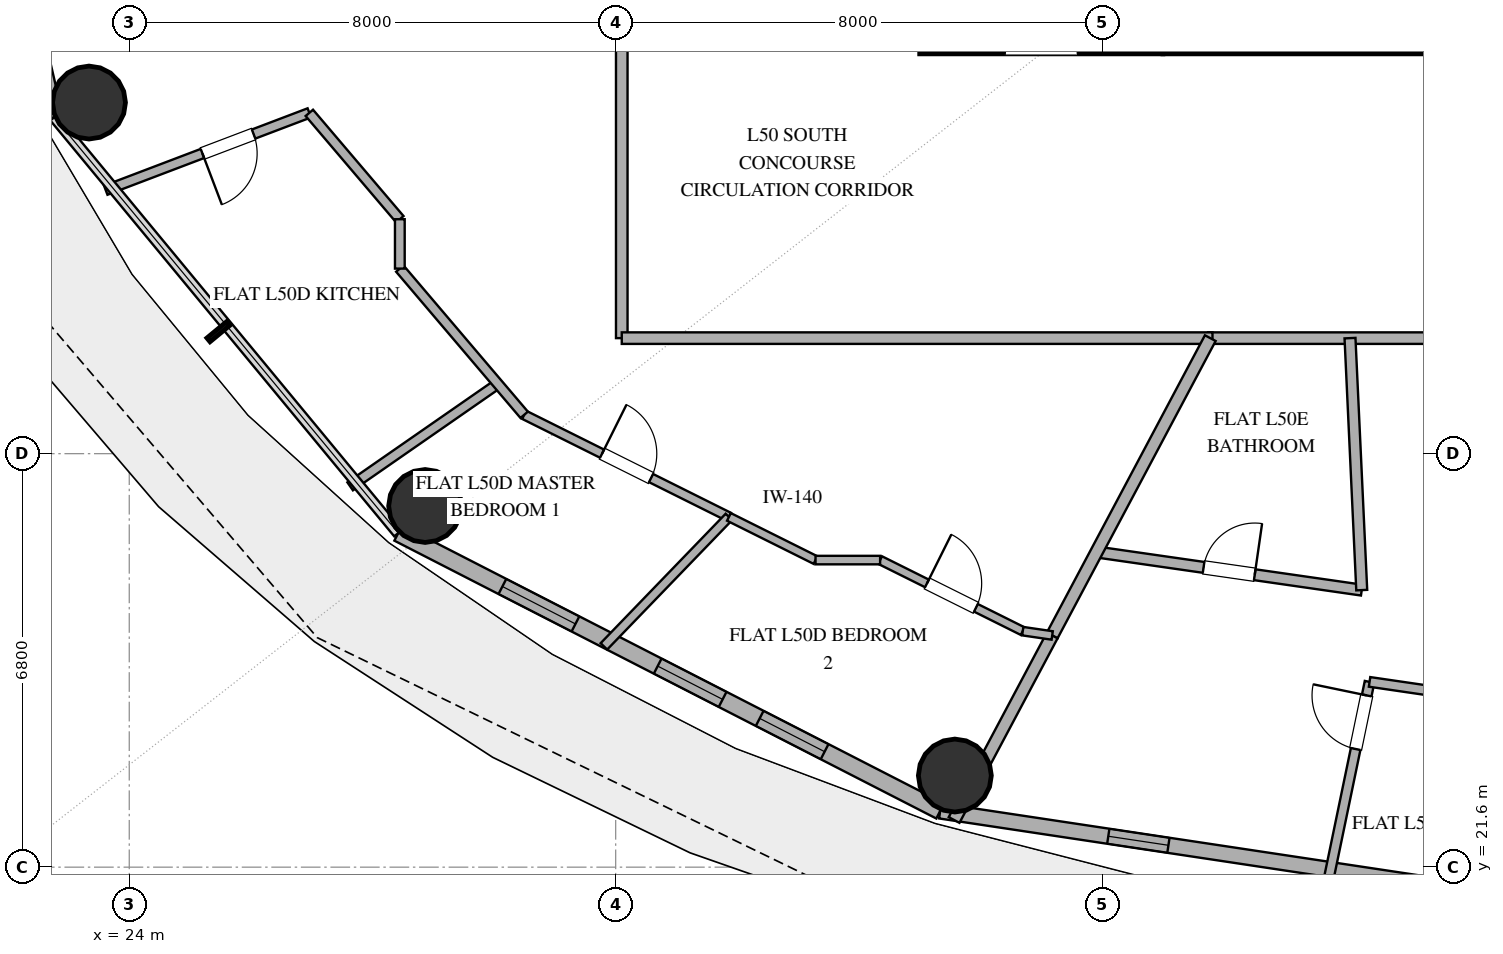
"""IFC4 building model, lengths in metres.
Left out: names, types, materials, properties, quantities, classifications, styles, units other than length and angle.
Written with IfcOpenShell. Run it as: python <this file> out.ifc"""

import sys

from ifc_helpers import new_model, si_unit, direction, frame, frame_2d, origin, origin_2d, place, context, subcontext, project, spatial, rectangle, hollow_circle, extrude, element, fill, save


model = new_model("IFC4")
c1 = context("Model", 3, precision=1e-05, world=origin(), true_north=direction((0.0, 1.0)))
c2 = subcontext(c1, "Body", "Model", "MODEL_VIEW")
j1 = project(units=[si_unit("LENGTHUNIT", "METRE"), si_unit("PLANEANGLEUNIT", "RADIAN")], contexts=[c1])
p1 = place(None, origin())
s1 = spatial("IfcSite", under=j1, at=p1, CompositionType="ELEMENT")
p2 = place(p1, origin())
s2 = spatial("IfcBuilding", under=s1, at=p2, CompositionType="ELEMENT")
p3 = place(p2, frame((0.0, 0.0, 197.4)))
s3 = spatial("IfcBuildingStorey", under=s2, at=p3, CompositionType="ELEMENT", Elevation=197.4)
p4 = place(p3, frame((37.0, 35.2, 0.0), z_axis=(0.0, 0.0, 1.0), x_axis=(1.0, 0.0, 0.0)))
e1 = element("IfcWall", 1, at=p4, inside=s3, PredefinedType="SHEAR", context=c2, shape_type="SweptSolid", body=[
    extrude(rectangle(XDim=4.0, YDim=0.45, at=frame_2d((2.0, 0.0))), origin(), (0.0, 0.0, 1.0), 3.25),
])
p5 = place(p4, frame((1.4, 0.0, 0.0)))
e2 = element("IfcOpeningElement", 2, at=p5, cuts=e1, PredefinedType="OPENING", context=c2, shape_type="SweptSolid", body=[
    extrude(rectangle(XDim=1.2, YDim=2.15, at=frame_2d((0.6, 1.075))), frame((0.0, 0.235, 0.0), z_axis=(0.0, -1.0, 0.0), x_axis=(1.0, 0.0, 0.0)), (0.0, 0.0, 1.0), 0.47),
])
p6 = place(p3, frame((41.0, 35.2, 0.0), z_axis=(0.0, 0.0, 1.0), x_axis=(1.0, 0.0, 0.0)))
e3 = element("IfcWall", 3, at=p6, inside=s3, PredefinedType="SHEAR", context=c2, shape_type="SweptSolid", body=[
    extrude(rectangle(XDim=14.0, YDim=0.45, at=frame_2d((7.0, 0.0))), origin(), (0.0, 0.0, 1.0), 3.25),
])
p7 = place(p6, frame((6.1, 0.0, 0.0)))
e4 = element("IfcOpeningElement", 4, at=p7, cuts=e3, PredefinedType="OPENING", context=c2, shape_type="SweptSolid", body=[
    extrude(rectangle(XDim=1.8, YDim=2.25, at=frame_2d((0.9, 1.125))), frame((0.0, 0.235, 0.0), z_axis=(0.0, -1.0, 0.0), x_axis=(1.0, 0.0, 0.0)), (0.0, 0.0, 1.0), 0.47),
])
for number, where, z_axis, x_axis in (
    (5, (23.338, 34.174, 0.0), (0.0, 0.0, 1.0), (1.0, 0.0, 0.0)),
    (6, (28.866, 27.54, 0.0), (0.0, 0.0, 1.0), (1.0, 0.0, 0.0)),
    (7, (37.578, 23.107, 0.0), (0.0, 0.0, 1.0), (1.0, 0.0, 0.0)),
):
    element("IfcColumn", number, at=place(p3, frame(where, z_axis=z_axis, x_axis=x_axis)), inside=s3, PredefinedType="COLUMN", context=c2, shape_type="SweptSolid", body=[
        extrude(hollow_circle(Radius=0.6, WallThickness=0.032, at=origin_2d()), origin(), (0.0, 0.0, 1.0), 3.25),
    ])
p8 = place(p3, frame((20.901, 42.0, 0.0), z_axis=(0.0, 0.0, 1.0), x_axis=(0.225473184558, -0.974249374157, 0.0)))
e8 = element("IfcWall", 8, at=p8, inside=s3, PredefinedType="SOLIDWALL", context=c2, shape_type="SweptSolid", body=[
    extrude(rectangle(XDim=8.28, YDim=0.28, at=frame_2d((4.14, 0.0))), origin(), (0.0, 0.0, 1.0), 3.25),
])
p9 = place(p8, frame((5.144, 0.0, 0.0)))
e9 = element("IfcOpeningElement", 9, at=p9, cuts=e8, PredefinedType="OPENING", context=c2, shape_type="SweptSolid", body=[
    extrude(rectangle(XDim=1.6, YDim=2.25, at=frame_2d((0.8, 1.125))), frame((0.0, 0.15, 0.0), z_axis=(0.0, -1.0, 0.0), x_axis=(1.0, 0.0, 0.0)), (0.0, 0.0, 1.0), 0.3),
])
p10 = place(p3, frame((28.424, 27.094, 0.0), z_axis=(0.0, 0.0, 1.0), x_axis=(0.889872523182, -0.456209263919, 0.0)))
e10 = element("IfcWall", 10, at=p10, inside=s3, PredefinedType="SOLIDWALL", context=c2, shape_type="SweptSolid", body=[
    extrude(rectangle(XDim=10.016, YDim=0.28, at=frame_2d((5.008, 0.0))), origin(), (0.0, 0.0, 1.0), 3.25),
])
p11 = place(p10, frame((1.925, 0.0, 0.85)))
e11 = element("IfcOpeningElement", 11, at=p11, cuts=e10, PredefinedType="OPENING", context=c2, shape_type="SweptSolid", body=[
    extrude(rectangle(XDim=1.35, YDim=1.8, at=frame_2d((0.675, 0.9))), frame((0.0, 0.15, 0.0), z_axis=(0.0, -1.0, 0.0), x_axis=(1.0, 0.0, 0.0)), (0.0, 0.0, 1.0), 0.3),
])
p12 = place(p10, frame((4.795, 0.0, 0.85)))
e12 = element("IfcOpeningElement", 12, at=p12, cuts=e10, PredefinedType="OPENING", context=c2, shape_type="SweptSolid", body=[
    extrude(rectangle(XDim=1.2, YDim=1.8, at=frame_2d((0.6, 0.9))), frame((0.0, 0.15, 0.0), z_axis=(0.0, -1.0, 0.0), x_axis=(1.0, 0.0, 0.0)), (0.0, 0.0, 1.0), 0.3),
])
p13 = place(p10, frame((6.68, 0.0, 0.85)))
e13 = element("IfcOpeningElement", 13, at=p13, cuts=e10, PredefinedType="OPENING", context=c2, shape_type="SweptSolid", body=[
    extrude(rectangle(XDim=1.2, YDim=1.8, at=frame_2d((0.6, 0.9))), frame((0.0, 0.15, 0.0), z_axis=(0.0, -1.0, 0.0), x_axis=(1.0, 0.0, 0.0)), (0.0, 0.0, 1.0), 0.3),
])
p14 = place(p3, frame((37.337, 22.525, 0.0), z_axis=(0.0, 0.0, 1.0), x_axis=(0.988863993413, -0.148822049884, 0.0)))
e14 = element("IfcWall", 14, at=p14, inside=s3, PredefinedType="SOLIDWALL", context=c2, shape_type="SweptSolid", body=[
    extrude(rectangle(XDim=10.783, YDim=0.25, at=frame_2d((5.392, 0.0))), origin(), (0.0, 0.0, 1.0), 3.25),
])
p15 = place(p14, frame((2.796, 0.0, 1.42)))
e15 = element("IfcOpeningElement", 15, at=p15, cuts=e14, PredefinedType="OPENING", context=c2, shape_type="SweptSolid", body=[
    extrude(rectangle(XDim=1.0, YDim=1.05, at=frame_2d((0.5, 0.525))), frame((0.0, 0.135, 0.0), z_axis=(0.0, -1.0, 0.0), x_axis=(1.0, 0.0, 0.0)), (0.0, 0.0, 1.0), 0.27),
])
p16 = place(p3, frame((32.1, 30.3, 0.0), z_axis=(0.0, 0.0, 1.0), x_axis=(0.0, 1.0, 0.0)))
e16 = element("IfcWall", 16, at=p16, inside=s3, PredefinedType="PARTITIONING", context=c2, shape_type="SweptSolid", body=[
    extrude(rectangle(XDim=12.287, YDim=0.19, at=frame_2d((6.144, 0.0))), origin(), (0.0, 0.0, 1.0), 2.61),
])
p17 = place(p16, frame((5.601, 0.0, 0.0)))
e17 = element("IfcOpeningElement", 17, at=p17, cuts=e16, PredefinedType="OPENING", context=c2, shape_type="SweptSolid", body=[
    extrude(rectangle(XDim=1.0, YDim=2.2, at=frame_2d((0.5, 1.1))), frame((0.0, 0.105, 0.0), z_axis=(0.0, -1.0, 0.0), x_axis=(1.0, 0.0, 0.0)), (0.0, 0.0, 1.0), 0.21),
])
p18 = place(p3, frame((41.743, 30.3, 0.0), z_axis=(0.0, 0.0, 1.0), x_axis=(1.0, 0.0, 0.0)))
e18 = element("IfcWall", 18, at=p18, inside=s3, PredefinedType="PARTITIONING", context=c2, shape_type="SweptSolid", body=[
    extrude(rectangle(XDim=22.157, YDim=0.19, at=frame_2d((11.079, 0.0))), origin(), (0.0, 0.0, 1.0), 2.61),
])
p19 = place(p18, frame((7.451, 0.0, 0.0)))
e19 = element("IfcOpeningElement", 19, at=p19, cuts=e18, PredefinedType="OPENING", context=c2, shape_type="SweptSolid", body=[
    extrude(rectangle(XDim=1.0, YDim=2.2, at=frame_2d((0.5, 1.1))), frame((0.0, 0.105, 0.0), z_axis=(0.0, -1.0, 0.0), x_axis=(1.0, 0.0, 0.0)), (0.0, 0.0, 1.0), 0.21),
])
p20 = place(p18, frame((17.344, 0.0, 0.0)))
e20 = element("IfcOpeningElement", 20, at=p20, cuts=e18, PredefinedType="OPENING", context=c2, shape_type="SweptSolid", body=[
    extrude(rectangle(XDim=1.0, YDim=2.2, at=frame_2d((0.5, 1.1))), frame((0.0, 0.105, 0.0), z_axis=(0.0, -1.0, 0.0), x_axis=(1.0, 0.0, 0.0)), (0.0, 0.0, 1.0), 0.21),
])
p21 = place(p3, frame((41.815, 30.3, 0.0), z_axis=(0.0, 0.0, 1.0), x_axis=(-1.0, 0.0, 0.0)))
e21 = element("IfcWall", 21, at=p21, inside=s3, PredefinedType="PARTITIONING", context=c2, shape_type="SweptSolid", body=[
    extrude(rectangle(XDim=9.715, YDim=0.19, at=frame_2d((4.857, 0.0))), origin(), (0.0, 0.0, 1.0), 2.61),
])
p22 = place(p3, frame((39.909, 26.783, 0.0), z_axis=(0.0, 0.0, 1.0), x_axis=(0.989831677838, -0.142243627443, 0.0)))
e22 = element("IfcWall", 22, at=p22, inside=s3, PredefinedType="PLUMBINGWALL", context=c2, shape_type="SweptSolid", body=[
    extrude(rectangle(XDim=4.406, YDim=0.18, at=frame_2d((2.203, 0.0))), origin(), (0.0, 0.0, 1.0), 2.61),
])
p23 = place(p22, frame((1.778, 0.0, 0.0)))
e23 = element("IfcOpeningElement", 23, at=p23, cuts=e22, PredefinedType="OPENING", context=c2, shape_type="SweptSolid", body=[
    extrude(rectangle(XDim=0.85, YDim=2.1, at=frame_2d((0.425, 1.05))), frame((0.0, 0.1, 0.0), z_axis=(0.0, -1.0, 0.0), x_axis=(1.0, 0.0, 0.0)), (0.0, 0.0, 1.0), 0.2),
])
p24 = place(p3, frame((44.27, 26.156, 0.0), z_axis=(0.0, 0.0, 1.0), x_axis=(-0.046552902745, 0.998915825906, 0.0)))
e24 = element("IfcWall", 24, at=p24, inside=s3, PredefinedType="PLUMBINGWALL", context=c2, shape_type="SweptSolid", body=[
    extrude(rectangle(XDim=4.148, YDim=0.18, at=frame_2d((2.074, 0.0))), origin(), (0.0, 0.0, 1.0), 2.61),
])
p25 = place(p3, frame((39.179, 25.41, 0.0), z_axis=(0.0, 0.0, 1.0), x_axis=(0.469450659963, 0.88295870677, 0.0)))
e25 = element("IfcWall", 25, at=p25, inside=s3, PredefinedType="PARTITIONING", context=c2, shape_type="SweptSolid", body=[
    extrude(rectangle(XDim=5.538, YDim=0.2, at=frame_2d((2.769, 0.0))), origin(), (0.0, 0.0, 1.0), 2.61),
])
p26 = place(p3, frame((30.495, 29.039, 0.0), z_axis=(0.0, 0.0, 1.0), x_axis=(0.894945698469, -0.44617507415, 0.0)))
e26 = element("IfcWall", 26, at=p26, inside=s3, PredefinedType="PARTITIONING", context=c2, shape_type="SweptSolid", body=[
    extrude(rectangle(XDim=3.762, YDim=0.15, at=frame_2d((1.881, 0.0))), origin(), (0.0, 0.0, 1.0), 2.61),
])
p27 = place(p26, frame((1.431, 0.0, 0.0)))
e27 = element("IfcOpeningElement", 27, at=p27, cuts=e26, PredefinedType="OPENING", context=c2, shape_type="SweptSolid", body=[
    extrude(rectangle(XDim=0.9, YDim=2.1, at=frame_2d((0.45, 1.05))), frame((0.0, 0.085, 0.0), z_axis=(0.0, -1.0, 0.0), x_axis=(1.0, 0.0, 0.0)), (0.0, 0.0, 1.0), 0.17),
])
p28 = place(p3, frame((26.962, 34.005, 0.0), z_axis=(0.0, 0.0, 1.0), x_axis=(-0.934799422257, -0.355176069222, 0.0)))
e28 = element("IfcWall", 28, at=p28, inside=s3, PredefinedType="PLUMBINGWALL", context=c2, shape_type="SweptSolid", body=[
    extrude(rectangle(XDim=3.582, YDim=0.16, at=frame_2d((1.791, 0.0))), origin(), (0.0, 0.0, 1.0), 2.61),
])
p29 = place(p28, frame((0.981, 0.0, 0.0)))
e29 = element("IfcOpeningElement", 29, at=p29, cuts=e28, PredefinedType="OPENING", context=c2, shape_type="SweptSolid", body=[
    extrude(rectangle(XDim=0.9, YDim=2.1, at=frame_2d((0.45, 1.05))), frame((0.0, 0.09, 0.0), z_axis=(0.0, -1.0, 0.0), x_axis=(1.0, 0.0, 0.0)), (0.0, 0.0, 1.0), 0.18),
])
p30 = place(p3, frame((39.179, 25.41, 0.0), z_axis=(0.0, 0.0, 1.0), x_axis=(-0.469492799927, -0.882936300543, 0.0)))
e30 = element("IfcWall", 30, at=p30, inside=s3, PredefinedType="PARTITIONING", context=c2, shape_type="SweptSolid", body=[
    extrude(rectangle(XDim=3.437, YDim=0.2, at=frame_2d((1.718, 0.0))), origin(), (0.0, 0.0, 1.0), 2.61),
])
p31 = place(p3, frame((43.733, 21.441, 0.0), z_axis=(0.0, 0.0, 1.0), x_axis=(0.203194875639, 0.979138316334, 0.0)))
e31 = element("IfcWall", 31, at=p31, inside=s3, PredefinedType="PLUMBINGWALL", context=c2, shape_type="SweptSolid", body=[
    extrude(rectangle(XDim=3.274, YDim=0.16, at=frame_2d((1.637, 0.0))), origin(), (0.0, 0.0, 1.0), 2.61),
])
p32 = place(p31, frame((2.147, 0.0, 0.0)))
e32 = element("IfcOpeningElement", 32, at=p32, cuts=e31, PredefinedType="OPENING", context=c2, shape_type="SweptSolid", body=[
    extrude(rectangle(XDim=0.9, YDim=2.1, at=frame_2d((0.45, 1.05))), frame((0.0, 0.09, 0.0), z_axis=(0.0, -1.0, 0.0), x_axis=(1.0, 0.0, 0.0)), (0.0, 0.0, 1.0), 0.18),
])
p33 = place(p3, frame((44.398, 24.647, 0.0), z_axis=(0.0, 0.0, 1.0), x_axis=(0.989478635987, -0.144679054896, 0.0)))
e33 = element("IfcWall", 33, at=p33, inside=s3, PredefinedType="PLUMBINGWALL", context=c2, shape_type="SweptSolid", body=[
    extrude(rectangle(XDim=3.64, YDim=0.16, at=frame_2d((1.82, 0.0))), origin(), (0.0, 0.0, 1.0), 2.61),
])
p34 = place(p3, frame((33.862, 27.36, 0.0), z_axis=(0.0, 0.0, 1.0), x_axis=(-0.694625426755, -0.719371612246, 0.0)))
e34 = element("IfcWall", 34, at=p34, inside=s3, PredefinedType="PARTITIONING", context=c2, shape_type="SweptSolid", body=[
    extrude(rectangle(XDim=2.96, YDim=0.15, at=frame_2d((1.48, 0.0))), origin(), (0.0, 0.0, 1.0), 2.61),
])
p35 = place(p3, frame((30.062, 29.548, 0.0), z_axis=(0.0, 0.0, 1.0), x_axis=(-0.821498907673, -0.570210088207, 0.0)))
e35 = element("IfcWall", 35, at=p35, inside=s3, PredefinedType="PLUMBINGWALL", context=c2, shape_type="SweptSolid", body=[
    extrude(rectangle(XDim=2.957, YDim=0.16, at=frame_2d((1.478, 0.0))), origin(), (0.0, 0.0, 1.0), 2.61),
])
p36 = place(p3, frame((36.349, 26.65, 0.0), z_axis=(0.0, 0.0, 1.0), x_axis=(0.895041110332, -0.445983644112, 0.0)))
e36 = element("IfcWall", 36, at=p36, inside=s3, PredefinedType="PARTITIONING", context=c2, shape_type="SweptSolid", body=[
    extrude(rectangle(XDim=2.621, YDim=0.14, at=frame_2d((1.311, 0.0))), origin(), (0.0, 0.0, 1.0), 2.61),
])
p37 = place(p36, frame((0.861, 0.0, 0.0)))
e37 = element("IfcOpeningElement", 37, at=p37, cuts=e36, PredefinedType="OPENING", context=c2, shape_type="SweptSolid", body=[
    extrude(rectangle(XDim=0.9, YDim=2.1, at=frame_2d((0.45, 1.05))), frame((0.0, 0.08, 0.0), z_axis=(0.0, -1.0, 0.0), x_axis=(1.0, 0.0, 0.0)), (0.0, 0.0, 1.0), 0.16),
])
p38 = place(p3, frame((30.495, 29.039, 0.0), z_axis=(0.0, 0.0, 1.0), x_axis=(-0.647888606369, 0.761735094201, 0.0)))
e38 = element("IfcWall", 38, at=p38, inside=s3, PredefinedType="PLUMBINGWALL", context=c2, shape_type="SweptSolid", body=[
    extrude(rectangle(XDim=3.157, YDim=0.16, at=frame_2d((1.578, 0.0))), origin(), (0.0, 0.0, 1.0), 2.61),
])
p39 = place(p3, frame((28.45, 32.256, 0.0), z_axis=(0.0, 0.0, 1.0), x_axis=(-0.648055662854, 0.761592973866, 0.0)))
e39 = element("IfcWall", 39, at=p39, inside=s3, PredefinedType="PLUMBINGWALL", context=c2, shape_type="SweptSolid", body=[
    extrude(rectangle(XDim=2.297, YDim=0.16, at=frame_2d((1.148, 0.0))), origin(), (0.0, 0.0, 1.0), 2.61),
])
p40 = place(p3, frame((33.862, 27.36, 0.0), z_axis=(0.0, 0.0, 1.0), x_axis=(0.894917522296, -0.446231585937, 0.0)))
e40 = element("IfcWall", 40, at=p40, inside=s3, PredefinedType="PARTITIONING", context=c2, shape_type="SweptSolid", body=[
    extrude(rectangle(XDim=1.592, YDim=0.14, at=frame_2d((0.796, 0.0))), origin(), (0.0, 0.0, 1.0), 2.61),
])
p41 = place(p3, frame((35.287, 26.65, 0.0), z_axis=(0.0, 0.0, 1.0), x_axis=(1.0, 0.0, 0.0)))
e41 = element("IfcWall", 41, at=p41, inside=s3, PredefinedType="PARTITIONING", context=c2, shape_type="SweptSolid", body=[
    extrude(rectangle(XDim=1.062, YDim=0.14, at=frame_2d((0.531, 0.0))), origin(), (0.0, 0.0, 1.0), 2.61),
])
p42 = place(p3, frame((28.45, 31.443, 0.0), z_axis=(0.0, 0.0, 1.0), x_axis=(0.0, 1.0, 0.0)))
e42 = element("IfcWall", 42, at=p42, inside=s3, PredefinedType="PLUMBINGWALL", context=c2, shape_type="SweptSolid", body=[
    extrude(rectangle(XDim=0.812, YDim=0.16, at=frame_2d((0.406, 0.0))), origin(), (0.0, 0.0, 1.0), 2.61),
])
p43 = place(p3, frame((38.695, 25.481, 0.0), z_axis=(0.0, 0.0, 1.0), x_axis=(0.989485449351, -0.144632449754, 0.0)))
e43 = element("IfcWall", 43, at=p43, inside=s3, PredefinedType="PARTITIONING", context=c2, shape_type="SweptSolid", body=[
    extrude(rectangle(XDim=0.49, YDim=0.14, at=frame_2d((0.245, 0.0))), origin(), (0.0, 0.0, 1.0), 2.61),
])
p44 = place(p11, origin())
e44 = element("IfcWindow", 44, at=p44, inside=s3, PartitioningType="SINGLE_PANEL", PredefinedType="WINDOW", context=c2, shape_type="SweptSolid", body=[
    extrude(rectangle(XDim=1.35, YDim=1.8, at=frame_2d((0.675, 0.9))), frame((0.0, 0.03, 0.0), z_axis=(0.0, -1.0, 0.0), x_axis=(1.0, 0.0, 0.0)), (0.0, 0.0, 1.0), 0.06),
])
fill(e11, e44)
p45 = place(p12, origin())
e45 = element("IfcWindow", 45, at=p45, inside=s3, PartitioningType="SINGLE_PANEL", PredefinedType="WINDOW", context=c2, shape_type="SweptSolid", body=[
    extrude(rectangle(XDim=1.2, YDim=1.8, at=frame_2d((0.6, 0.9))), frame((0.0, 0.03, 0.0), z_axis=(0.0, -1.0, 0.0), x_axis=(1.0, 0.0, 0.0)), (0.0, 0.0, 1.0), 0.06),
])
fill(e12, e45)
p46 = place(p13, origin())
e46 = element("IfcWindow", 46, at=p46, inside=s3, PartitioningType="SINGLE_PANEL", PredefinedType="WINDOW", context=c2, shape_type="SweptSolid", body=[
    extrude(rectangle(XDim=1.2, YDim=1.8, at=frame_2d((0.6, 0.9))), frame((0.0, 0.03, 0.0), z_axis=(0.0, -1.0, 0.0), x_axis=(1.0, 0.0, 0.0)), (0.0, 0.0, 1.0), 0.06),
])
fill(e13, e46)
p47 = place(p15, origin())
e47 = element("IfcWindow", 47, at=p47, inside=s3, PartitioningType="SINGLE_PANEL", PredefinedType="WINDOW", context=c2, shape_type="SweptSolid", body=[
    extrude(rectangle(XDim=1.0, YDim=1.05, at=frame_2d((0.5, 0.525))), frame((0.0, 0.03, 0.0), z_axis=(0.0, -1.0, 0.0), x_axis=(1.0, 0.0, 0.0)), (0.0, 0.0, 1.0), 0.06),
])
fill(e15, e47)
p48 = place(p23, origin())
e48 = element("IfcDoor", 48, at=p48, inside=s3, OperationType="SINGLE_SWING_RIGHT", PredefinedType="DOOR", context=c2, shape_type="SweptSolid", body=[
    extrude(rectangle(XDim=0.85, YDim=2.1, at=frame_2d((0.425, 1.05))), frame((0.0, 0.025, 0.0), z_axis=(0.0, -1.0, 0.0), x_axis=(1.0, 0.0, 0.0)), (0.0, 0.0, 1.0), 0.05),
])
fill(e23, e48)
p49 = place(p27, origin())
e49 = element("IfcDoor", 49, at=p49, inside=s3, OperationType="SINGLE_SWING_LEFT", PredefinedType="DOOR", context=c2, shape_type="SweptSolid", body=[
    extrude(rectangle(XDim=0.9, YDim=2.1, at=frame_2d((0.45, 1.05))), frame((0.0, 0.025, 0.0), z_axis=(0.0, -1.0, 0.0), x_axis=(1.0, 0.0, 0.0)), (0.0, 0.0, 1.0), 0.05),
])
fill(e27, e49)
p50 = place(p29, origin())
e50 = element("IfcDoor", 50, at=p50, inside=s3, OperationType="SINGLE_SWING_RIGHT", PredefinedType="DOOR", context=c2, shape_type="SweptSolid", body=[
    extrude(rectangle(XDim=0.9, YDim=2.1, at=frame_2d((0.45, 1.05))), frame((0.0, 0.025, 0.0), z_axis=(0.0, -1.0, 0.0), x_axis=(1.0, 0.0, 0.0)), (0.0, 0.0, 1.0), 0.05),
])
fill(e29, e50)
p51 = place(p32, origin())
e51 = element("IfcDoor", 51, at=p51, inside=s3, OperationType="SINGLE_SWING_RIGHT", PredefinedType="DOOR", context=c2, shape_type="SweptSolid", body=[
    extrude(rectangle(XDim=0.9, YDim=2.1, at=frame_2d((0.45, 1.05))), frame((0.0, 0.025, 0.0), z_axis=(0.0, -1.0, 0.0), x_axis=(1.0, 0.0, 0.0)), (0.0, 0.0, 1.0), 0.05),
])
fill(e32, e51)
p52 = place(p37, origin())
e52 = element("IfcDoor", 52, at=p52, inside=s3, OperationType="SINGLE_SWING_LEFT", PredefinedType="DOOR", context=c2, shape_type="SweptSolid", body=[
    extrude(rectangle(XDim=0.9, YDim=2.1, at=frame_2d((0.45, 1.05))), frame((0.0, 0.025, 0.0), z_axis=(0.0, -1.0, 0.0), x_axis=(1.0, 0.0, 0.0)), (0.0, 0.0, 1.0), 0.05),
])
fill(e37, e52)
save(model, sys.argv[1])
